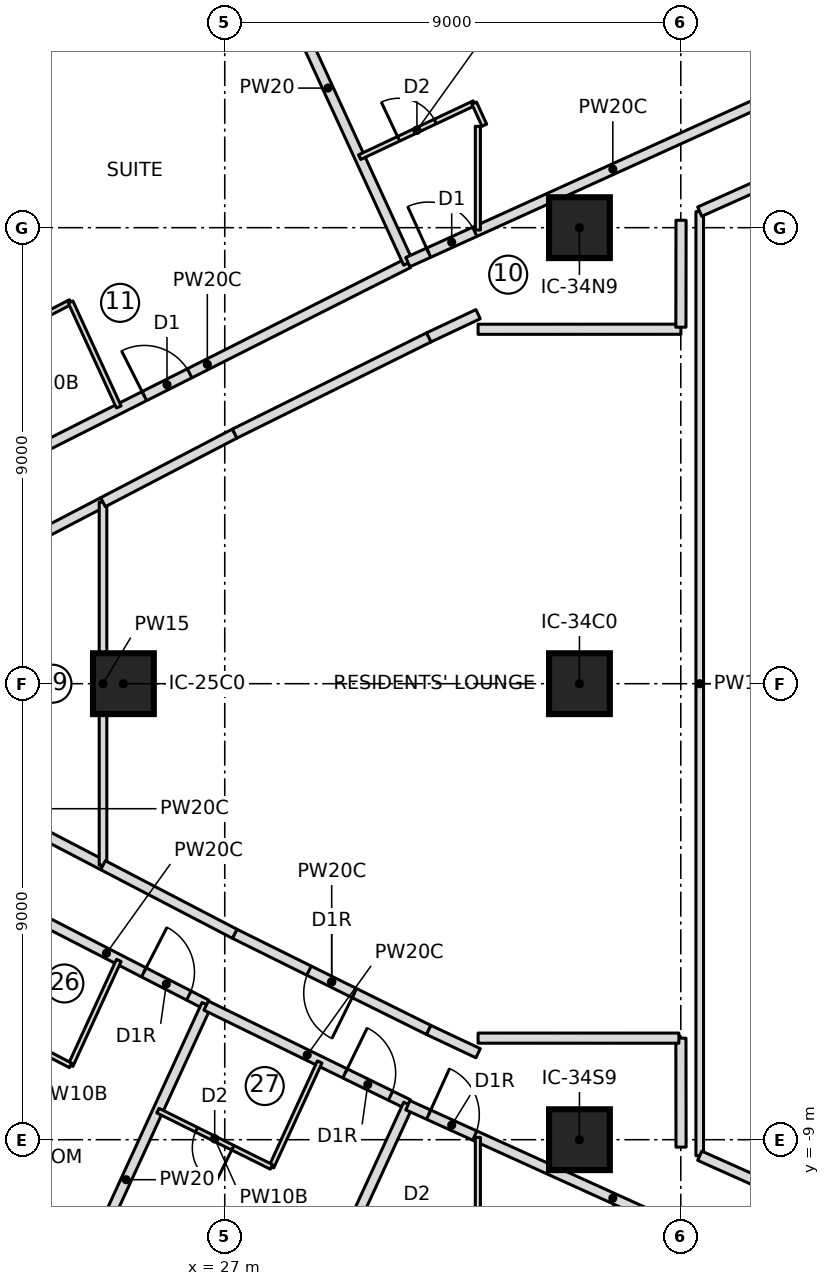
"""IFC4 building model, lengths in metres.
Left out: names, types, materials, properties, quantities, classifications, styles, units other than length and angle.
Written with IfcOpenShell. Run it as: python <this file> out.ifc"""

import sys

from ifc_helpers import new_model, si_unit, direction, frame, frame_2d, origin, origin_2d, place, context, subcontext, project, spatial, rectangle, extrude, element, fill, save


model = new_model("IFC4")
c1 = context("Model", 3, precision=1e-05, world=origin(), true_north=direction((0.0, 1.0)))
c2 = subcontext(c1, "Body", "Model", "MODEL_VIEW")
j1 = project(units=[si_unit("LENGTHUNIT", "METRE"), si_unit("PLANEANGLEUNIT", "RADIAN")], contexts=[c1])
p1 = place(None, origin())
s1 = spatial("IfcSite", under=j1, at=p1, CompositionType="ELEMENT")
p2 = place(p1, origin())
s2 = spatial("IfcBuilding", under=s1, at=p2, CompositionType="ELEMENT")
p3 = place(p2, frame((0.0, 0.0, 99.1)))
s3 = spatial("IfcBuildingStorey", under=s2, at=p3, CompositionType="ELEMENT", Elevation=99.1)
for number, where, z_axis, x_axis in (
    (1, (25.0, 0.0, 0.0), (0.0, 0.0, 1.0), (1.0, 0.0, 0.0)),
    (2, (34.0, -9.0, 0.0), (0.0, 0.0, 1.0), (1.0, 0.0, 0.0)),
    (3, (34.0, 0.0, 0.0), (0.0, 0.0, 1.0), (1.0, 0.0, 0.0)),
    (4, (34.0, 9.0, 0.0), (0.0, 0.0, 1.0), (1.0, 0.0, 0.0)),
):
    element("IfcColumn", number, at=place(p3, frame(where, z_axis=z_axis, x_axis=x_axis)), inside=s3, PredefinedType="COLUMN", context=c2, shape_type="SweptSolid", body=[
        extrude(rectangle(XDim=1.2, YDim=1.2, at=origin_2d()), origin(), (0.0, 0.0, 1.0), 3.55),
    ])
p4 = place(p3, frame((22.69, 4.302, 0.0), z_axis=(0.0, 0.0, 1.0), x_axis=(0.892904919467, 0.450245271815, 0.0)))
e5 = element("IfcWall", 5, at=p4, inside=s3, PredefinedType="PARTITIONING", context=c2, shape_type="SweptSolid", body=[
    extrude(rectangle(XDim=8.883, YDim=0.2, at=frame_2d((4.441, 0.0))), origin(), (0.0, 0.0, 1.0), 3.25),
])
p5 = place(p4, frame((3.05, 0.0, 0.0)))
e6 = element("IfcOpeningElement", 6, at=p5, cuts=e5, PredefinedType="OPENING", context=c2, shape_type="SweptSolid", body=[
    extrude(rectangle(XDim=1.0, YDim=2.1, at=frame_2d((0.5, 1.05))), frame((0.0, 0.11, 0.0), z_axis=(0.0, -1.0, 0.0), x_axis=(1.0, 0.0, 0.0)), (0.0, 0.0, 1.0), 0.22),
])
p6 = place(p3, frame((21.738, 6.377, 0.0), z_axis=(0.0, 0.0, 1.0), x_axis=(0.886911586599, 0.461939214135, 0.0)))
e7 = element("IfcWall", 7, at=p6, inside=s3, PredefinedType="PARTITIONING", context=c2, shape_type="SweptSolid", body=[
    extrude(rectangle(XDim=2.503, YDim=0.1, at=frame_2d((1.251, 0.0))), origin(), (0.0, 0.0, 1.0), 3.25),
])
p7 = place(p6, frame((0.85, 0.0, 0.0)))
e8 = element("IfcOpeningElement", 8, at=p7, cuts=e7, PredefinedType="OPENING", context=c2, shape_type="SweptSolid", body=[
    extrude(rectangle(XDim=0.8, YDim=2.1, at=frame_2d((0.4, 1.05))), frame((0.0, 0.06, 0.0), z_axis=(0.0, -1.0, 0.0), x_axis=(1.0, 0.0, 0.0)), (0.0, 0.0, 1.0), 0.12),
])
p8 = place(p3, frame((23.958, 7.533, 0.0), z_axis=(0.0, 0.0, 1.0), x_axis=(0.417454762401, -0.908697706253, 0.0)))
e9 = element("IfcWall", 9, at=p8, inside=s3, PredefinedType="PARTITIONING", context=c2, shape_type="SweptSolid", body=[
    extrude(rectangle(XDim=2.28, YDim=0.1, at=frame_2d((1.14, 0.0))), origin(), (0.0, 0.0, 1.0), 3.25),
])
p9 = place(p3, frame((30.622, 8.302, 0.0), z_axis=(0.0, 0.0, 1.0), x_axis=(-0.417429919618, 0.90870911859, 0.0)))
e10 = element("IfcWall", 10, at=p9, inside=s3, PredefinedType="PARTITIONING", context=c2, shape_type="SweptSolid", body=[
    extrude(rectangle(XDim=7.6, YDim=0.2, at=frame_2d((3.8, 0.0))), origin(), (0.0, 0.0, 1.0), 3.25),
])
p10 = place(p3, frame((30.614, 8.32, 0.0), z_axis=(0.0, 0.0, 1.0), x_axis=(0.910751030363, 0.41295588226, 0.0)))
e11 = element("IfcWall", 11, at=p10, inside=s3, PredefinedType="PARTITIONING", context=c2, shape_type="SweptSolid", body=[
    extrude(rectangle(XDim=8.883, YDim=0.2, at=frame_2d((4.442, 0.0))), origin(), (0.0, 0.0, 1.0), 3.25),
])
p11 = place(p10, frame((0.45, 0.0, 0.0)))
e12 = element("IfcOpeningElement", 12, at=p11, cuts=e11, PredefinedType="OPENING", context=c2, shape_type="SweptSolid", body=[
    extrude(rectangle(XDim=1.0, YDim=2.1, at=frame_2d((0.5, 1.05))), frame((0.0, 0.11, 0.0), z_axis=(0.0, -1.0, 0.0), x_axis=(1.0, 0.0, 0.0)), (0.0, 0.0, 1.0), 0.22),
])
p12 = place(p3, frame((29.662, 10.392, 0.0), z_axis=(0.0, 0.0, 1.0), x_axis=(0.904688082375, 0.426074493027, 0.0)))
e13 = element("IfcWall", 13, at=p12, inside=s3, PredefinedType="PARTITIONING", context=c2, shape_type="SweptSolid", body=[
    extrude(rectangle(XDim=2.5, YDim=0.1, at=frame_2d((1.25, 0.0))), origin(), (0.0, 0.0, 1.0), 3.25),
])
p13 = place(p12, frame((0.85, 0.0, 0.0)))
e14 = element("IfcOpeningElement", 14, at=p13, cuts=e13, PredefinedType="OPENING", context=c2, shape_type="SweptSolid", body=[
    extrude(rectangle(XDim=0.8, YDim=2.1, at=frame_2d((0.4, 1.05))), frame((0.0, 0.06, 0.0), z_axis=(0.0, -1.0, 0.0), x_axis=(1.0, 0.0, 0.0)), (0.0, 0.0, 1.0), 0.12),
])
p14 = place(p3, frame((31.924, 11.457, 0.0), z_axis=(0.0, 0.0, 1.0), x_axis=(0.4176025781, -0.908629785316, 0.0)))
e15 = element("IfcWall", 15, at=p14, inside=s3, PredefinedType="PARTITIONING", context=c2, shape_type="SweptSolid", body=[
    extrude(rectangle(XDim=0.479, YDim=0.1, at=frame_2d((0.239, 0.0))), origin(), (0.0, 0.0, 1.0), 3.25),
])
p15 = place(p3, frame((38.704, 11.989, 0.0), z_axis=(0.0, 0.0, 1.0), x_axis=(-0.417416334044, 0.908715359215, 0.0)))
e16 = element("IfcWall", 16, at=p15, inside=s3, PredefinedType="PARTITIONING", context=c2, shape_type="SweptSolid", body=[
    extrude(rectangle(XDim=7.604, YDim=0.2, at=frame_2d((3.802, 0.0))), origin(), (0.0, 0.0, 1.0), 3.25),
])
p16 = place(p3, frame((22.69, -4.302, 0.0), z_axis=(0.0, 0.0, 1.0), x_axis=(0.889236075961, -0.457448577667, 0.0)))
e17 = element("IfcWall", 17, at=p16, inside=s3, PredefinedType="PARTITIONING", context=c2, shape_type="SweptSolid", body=[
    extrude(rectangle(XDim=4.443, YDim=0.2, at=frame_2d((2.222, 0.0))), origin(), (0.0, 0.0, 1.0), 3.25),
])
p17 = place(p16, frame((3.05, 0.0, 0.0)))
e18 = element("IfcOpeningElement", 18, at=p17, cuts=e17, PredefinedType="OPENING", context=c2, shape_type="SweptSolid", body=[
    extrude(rectangle(XDim=1.0, YDim=2.1, at=frame_2d((0.5, 1.05))), frame((0.0, 0.11, 0.0), z_axis=(0.0, -1.0, 0.0), x_axis=(1.0, 0.0, 0.0)), (0.0, 0.0, 1.0), 0.22),
])
p18 = place(p3, frame((24.909, -5.462, 0.0), z_axis=(0.0, 0.0, 1.0), x_axis=(-0.417454762401, -0.908697706253, 0.0)))
e19 = element("IfcWall", 19, at=p18, inside=s3, PredefinedType="PARTITIONING", context=c2, shape_type="SweptSolid", body=[
    extrude(rectangle(XDim=2.28, YDim=0.1, at=frame_2d((1.14, 0.0))), origin(), (0.0, 0.0, 1.0), 3.25),
])
p19 = place(p3, frame((23.958, -7.533, 0.0), z_axis=(0.0, 0.0, 1.0), x_axis=(-0.886911586599, 0.461939214135, 0.0)))
e20 = element("IfcWall", 20, at=p19, inside=s3, PredefinedType="PARTITIONING", context=c2, shape_type="SweptSolid", body=[
    extrude(rectangle(XDim=2.503, YDim=0.1, at=frame_2d((1.251, 0.0))), origin(), (0.0, 0.0, 1.0), 3.25),
])
p20 = place(p19, frame((0.85, 0.0, 0.0)))
e21 = element("IfcOpeningElement", 21, at=p20, cuts=e20, PredefinedType="OPENING", context=c2, shape_type="SweptSolid", body=[
    extrude(rectangle(XDim=0.8, YDim=2.1, at=frame_2d((0.4, 1.05))), frame((0.0, 0.06, 0.0), z_axis=(0.0, -1.0, 0.0), x_axis=(1.0, 0.0, 0.0)), (0.0, 0.0, 1.0), 0.12),
])
p21 = place(p3, frame((23.467, -13.244, 0.0), z_axis=(0.0, 0.0, 1.0), x_axis=(0.417455028008, 0.908697584233, 0.0)))
e22 = element("IfcWall", 22, at=p21, inside=s3, PredefinedType="PARTITIONING", context=c2, shape_type="SweptSolid", body=[
    extrude(rectangle(XDim=7.603, YDim=0.2, at=frame_2d((3.802, 0.0))), origin(), (0.0, 0.0, 1.0), 3.25),
])
p22 = place(p3, frame((26.633, -6.353, 0.0), z_axis=(0.0, 0.0, 1.0), x_axis=(0.898502457097, -0.438968489291, 0.0)))
e23 = element("IfcWall", 23, at=p22, inside=s3, PredefinedType="PARTITIONING", context=c2, shape_type="SweptSolid", body=[
    extrude(rectangle(XDim=4.44, YDim=0.2, at=frame_2d((2.22, 0.0))), origin(), (0.0, 0.0, 1.0), 3.25),
])
p23 = place(p22, frame((3.05, 0.0, 0.0)))
e24 = element("IfcOpeningElement", 24, at=p23, cuts=e23, PredefinedType="OPENING", context=c2, shape_type="SweptSolid", body=[
    extrude(rectangle(XDim=1.0, YDim=2.1, at=frame_2d((0.5, 1.05))), frame((0.0, 0.11, 0.0), z_axis=(0.0, -1.0, 0.0), x_axis=(1.0, 0.0, 0.0)), (0.0, 0.0, 1.0), 0.22),
])
p24 = place(p3, frame((28.873, -7.467, 0.0), z_axis=(0.0, 0.0, 1.0), x_axis=(-0.417433204355, -0.908707609686, 0.0)))
e25 = element("IfcWall", 25, at=p24, inside=s3, PredefinedType="PARTITIONING", context=c2, shape_type="SweptSolid", body=[
    extrude(rectangle(XDim=2.278, YDim=0.1, at=frame_2d((1.139, 0.0))), origin(), (0.0, 0.0, 1.0), 3.25),
])
p25 = place(p3, frame((27.922, -9.537, 0.0), z_axis=(0.0, 0.0, 1.0), x_axis=(-0.895944857815, 0.444165297784, 0.0)))
e26 = element("IfcWall", 26, at=p25, inside=s3, PredefinedType="PARTITIONING", context=c2, shape_type="SweptSolid", body=[
    extrude(rectangle(XDim=2.501, YDim=0.1, at=frame_2d((1.25, 0.0))), origin(), (0.0, 0.0, 1.0), 3.25),
])
p26 = place(p25, frame((0.85, 0.0, 0.0)))
e27 = element("IfcOpeningElement", 27, at=p26, cuts=e26, PredefinedType="OPENING", context=c2, shape_type="SweptSolid", body=[
    extrude(rectangle(XDim=0.8, YDim=2.1, at=frame_2d((0.4, 1.05))), frame((0.0, 0.06, 0.0), z_axis=(0.0, -1.0, 0.0), x_axis=(1.0, 0.0, 0.0)), (0.0, 0.0, 1.0), 0.12),
])
p27 = place(p3, frame((27.449, -15.208, 0.0), z_axis=(0.0, 0.0, 1.0), x_axis=(0.417429919618, 0.90870911859, 0.0)))
e28 = element("IfcWall", 28, at=p27, inside=s3, PredefinedType="PARTITIONING", context=c2, shape_type="SweptSolid", body=[
    extrude(rectangle(XDim=7.6, YDim=0.2, at=frame_2d((3.8, 0.0))), origin(), (0.0, 0.0, 1.0), 3.25),
])
p28 = place(p3, frame((30.614, -8.32, 0.0), z_axis=(0.0, 0.0, 1.0), x_axis=(0.910751030363, -0.41295588226, 0.0)))
e29 = element("IfcWall", 29, at=p28, inside=s3, PredefinedType="PARTITIONING", context=c2, shape_type="SweptSolid", body=[
    extrude(rectangle(XDim=8.883, YDim=0.2, at=frame_2d((4.442, 0.0))), origin(), (0.0, 0.0, 1.0), 3.25),
])
p29 = place(p28, frame((0.45, 0.0, 0.0)))
e30 = element("IfcOpeningElement", 30, at=p29, cuts=e29, PredefinedType="OPENING", context=c2, shape_type="SweptSolid", body=[
    extrude(rectangle(XDim=1.0, YDim=2.1, at=frame_2d((0.5, 1.05))), frame((0.0, 0.11, 0.0), z_axis=(0.0, -1.0, 0.0), x_axis=(1.0, 0.0, 0.0)), (0.0, 0.0, 1.0), 0.22),
])
for number, where, z_axis, x_axis in (
    (31, (23.407, 2.962, 0.0), (0.0, 0.0, 1.0), (0.887, 0.462, 0.0)),
    (32, (24.598, -3.582, 0.0), (0.0, 0.0, 1.0), (-0.887, 0.462, 0.0)),
):
    element("IfcWall", number, at=place(p3, frame(where, z_axis=z_axis, x_axis=x_axis)), inside=s3, PredefinedType="PARTITIONING", context=c2, shape_type="SweptSolid", body=[
        extrude(rectangle(XDim=1.343, YDim=0.2, at=frame_2d((0.671, 0.0))), origin(), (0.0, 0.0, 1.0), 3.25),
    ])
p30 = place(p3, frame((24.598, -3.582, 0.0), z_axis=(0.0, 0.0, 1.0), x_axis=(0.0, 1.0, 0.0)))
e33 = element("IfcWall", 33, at=p30, inside=s3, PredefinedType="PARTITIONING", context=c2, shape_type="SweptSolid", body=[
    extrude(rectangle(XDim=7.165, YDim=0.15, at=frame_2d((3.582, 0.0))), origin(), (0.0, 0.0, 1.0), 3.25),
])
p31 = place(p3, frame((31.025, -6.833, 0.0), z_axis=(0.0, 0.0, 1.0), x_axis=(-0.895975836328, 0.44410280422, 0.0)))
e34 = element("IfcWall", 34, at=p31, inside=s3, PredefinedType="PARTITIONING", context=c2, shape_type="SweptSolid", body=[
    extrude(rectangle(XDim=4.273, YDim=0.2, at=frame_2d((2.137, 0.0))), origin(), (0.0, 0.0, 1.0), 3.25),
])
p32 = place(p31, frame((1.636, 0.0, 0.0)))
e35 = element("IfcOpeningElement", 35, at=p32, cuts=e34, PredefinedType="OPENING", context=c2, shape_type="SweptSolid", body=[
    extrude(rectangle(XDim=1.0, YDim=2.1, at=frame_2d((0.5, 1.05))), frame((0.0, 0.11, 0.0), z_axis=(0.0, -1.0, 0.0), x_axis=(1.0, 0.0, 0.0)), (0.0, 0.0, 1.0), 0.22),
])
for number, where, z_axis, x_axis in (
    (36, (31.025, 6.833, 0.0), (0.0, 0.0, 1.0), (0.905, 0.426, 0.0)),
    (37, (32.0, -7.293, 0.0), (0.0, 0.0, 1.0), (-0.905, 0.426, 0.0)),
):
    element("IfcWall", number, at=place(p3, frame(where, z_axis=z_axis, x_axis=x_axis)), inside=s3, PredefinedType="PARTITIONING", context=c2, shape_type="SweptSolid", body=[
        extrude(rectangle(XDim=1.078, YDim=0.2, at=frame_2d((0.539, 0.0))), origin(), (0.0, 0.0, 1.0), 3.25),
    ])
for number, where, z_axis, x_axis in (
    (38, (27.196, -4.936, 0.0), (0.0, 0.0, 1.0), (-0.887, 0.462, 0.0)),
    (39, (24.598, 3.582, 0.0), (0.0, 0.0, 1.0), (0.887, 0.462, 0.0)),
):
    element("IfcWall", number, at=place(p3, frame(where, z_axis=z_axis, x_axis=x_axis)), inside=s3, PredefinedType="PARTITIONING", context=c2, shape_type="SweptSolid", body=[
        extrude(rectangle(XDim=2.93, YDim=0.2, at=frame_2d((1.465, 0.0))), origin(), (0.0, 0.0, 1.0), 3.25),
    ])
p33 = place(p3, frame((27.196, 4.936, 0.0), z_axis=(0.0, 0.0, 1.0), x_axis=(0.895975836328, 0.44410280422, 0.0)))
e40 = element("IfcWall", 40, at=p33, inside=s3, PredefinedType="PARTITIONING", context=c2, shape_type="SweptSolid", body=[
    extrude(rectangle(XDim=4.273, YDim=0.2, at=frame_2d((2.137, 0.0))), origin(), (0.0, 0.0, 1.0), 3.25),
])
p34 = place(p3, frame((36.374, -9.317, 0.0), z_axis=(0.0, 0.0, 1.0), x_axis=(0.0, 1.0, 0.0)))
e41 = element("IfcWall", 41, at=p34, inside=s3, PredefinedType="PARTITIONING", context=c2, shape_type="SweptSolid", body=[
    extrude(rectangle(XDim=18.634, YDim=0.15, at=frame_2d((9.317, 0.0))), origin(), (0.0, 0.0, 1.0), 3.25),
])
for number, where, z_axis, x_axis in (
    (42, (38.792, -10.397, 0.0), (0.0, 0.0, 1.0), (-0.913, 0.408, 0.0)),
    (43, (36.374, 9.317, 0.0), (0.0, 0.0, 1.0), (0.913, 0.408, 0.0)),
):
    element("IfcWall", number, at=place(p3, frame(where, z_axis=z_axis, x_axis=x_axis)), inside=s3, PredefinedType="PARTITIONING", context=c2, shape_type="SweptSolid", body=[
        extrude(rectangle(XDim=2.648, YDim=0.2, at=frame_2d((1.324, 0.0))), origin(), (0.0, 0.0, 1.0), 3.25),
    ])
for number, where, z_axis, x_axis in (
    (44, (31.995, 11.0, 0.0), (0.0, 0.0, 1.0), (0.0, -1.0, 0.0)),
    (45, (31.995, -8.954, 0.0), (0.0, 0.0, 1.0), (0.0, -1.0, 0.0)),
):
    element("IfcWall", number, at=place(p3, frame(where, z_axis=z_axis, x_axis=x_axis)), inside=s3, PredefinedType="PARTITIONING", context=c2, shape_type="SweptSolid", body=[
        extrude(rectangle(XDim=2.046, YDim=0.1, at=frame_2d((1.023, 0.0))), origin(), (0.0, 0.0, 1.0), 3.25),
    ])
p35 = place(p3, frame((36.005, -9.146, 0.0), z_axis=(0.0, 0.0, 1.0), x_axis=(-0.001135073049, 0.999999355804, 0.0)))
e46 = element("IfcWall", 46, at=p35, inside=s3, PredefinedType="PARTITIONING", context=c2, shape_type="SweptSolid", body=[
    extrude(rectangle(XDim=2.151, YDim=0.2, at=frame_2d((1.075, 0.0))), origin(), (0.0, 0.0, 1.0), 3.25),
])
p36 = place(p3, frame((35.962, -6.996, 0.0), z_axis=(0.0, 0.0, 1.0), x_axis=(-0.999999992409, 0.000123213405, 0.0)))
e47 = element("IfcWall", 47, at=p36, inside=s3, PredefinedType="PARTITIONING", context=c2, shape_type="SweptSolid", body=[
    extrude(rectangle(XDim=3.963, YDim=0.2, at=frame_2d((1.981, 0.0))), origin(), (0.0, 0.0, 1.0), 3.25),
])
p37 = place(p3, frame((32.0, 6.995, 0.0), z_axis=(0.0, 0.0, 1.0), x_axis=(0.99999999256, 0.00012198097, 0.0)))
e48 = element("IfcWall", 48, at=p37, inside=s3, PredefinedType="PARTITIONING", context=c2, shape_type="SweptSolid", body=[
    extrude(rectangle(XDim=4.003, YDim=0.2, at=frame_2d((2.001, 0.0))), origin(), (0.0, 0.0, 1.0), 3.25),
])
p38 = place(p3, frame((36.002, 7.036, 0.0), z_axis=(0.0, 0.0, 1.0), x_axis=(0.001156603436, 0.999999331134, 0.0)))
e49 = element("IfcWall", 49, at=p38, inside=s3, PredefinedType="PARTITIONING", context=c2, shape_type="SweptSolid", body=[
    extrude(rectangle(XDim=2.111, YDim=0.2, at=frame_2d((1.055, 0.0))), origin(), (0.0, 0.0, 1.0), 3.25),
])
p39 = place(p5, origin())
e50 = element("IfcDoor", 50, at=p39, inside=s3, OperationType="SINGLE_SWING_LEFT", PredefinedType="DOOR", context=c2, shape_type="SweptSolid", body=[
    extrude(rectangle(XDim=1.0, YDim=2.1, at=frame_2d((0.5, 1.05))), frame((0.0, 0.025, 0.0), z_axis=(0.0, -1.0, 0.0), x_axis=(1.0, 0.0, 0.0)), (0.0, 0.0, 1.0), 0.05),
])
fill(e6, e50)
p40 = place(p13, origin())
e51 = element("IfcDoor", 51, at=p40, inside=s3, OperationType="SINGLE_SWING_LEFT", PredefinedType="DOOR", context=c2, shape_type="SweptSolid", body=[
    extrude(rectangle(XDim=0.8, YDim=2.1, at=frame_2d((0.4, 1.05))), frame((0.0, 0.025, 0.0), z_axis=(0.0, -1.0, 0.0), x_axis=(1.0, 0.0, 0.0)), (0.0, 0.0, 1.0), 0.05),
])
fill(e14, e51)
p41 = place(p11, origin())
e52 = element("IfcDoor", 52, at=p41, inside=s3, OperationType="SINGLE_SWING_LEFT", PredefinedType="DOOR", context=c2, shape_type="SweptSolid", body=[
    extrude(rectangle(XDim=1.0, YDim=2.1, at=frame_2d((0.5, 1.05))), frame((0.0, 0.025, 0.0), z_axis=(0.0, -1.0, 0.0), x_axis=(1.0, 0.0, 0.0)), (0.0, 0.0, 1.0), 0.05),
])
fill(e12, e52)
p42 = place(p17, origin())
e53 = element("IfcDoor", 53, at=p42, inside=s3, OperationType="SINGLE_SWING_RIGHT", PredefinedType="DOOR", context=c2, shape_type="SweptSolid", body=[
    extrude(rectangle(XDim=1.0, YDim=2.1, at=frame_2d((0.5, 1.05))), frame((0.0, 0.025, 0.0), z_axis=(0.0, -1.0, 0.0), x_axis=(1.0, 0.0, 0.0)), (0.0, 0.0, 1.0), 0.05),
])
fill(e18, e53)
p43 = place(p26, origin())
e54 = element("IfcDoor", 54, at=p43, inside=s3, OperationType="SINGLE_SWING_LEFT", PredefinedType="DOOR", context=c2, shape_type="SweptSolid", body=[
    extrude(rectangle(XDim=0.8, YDim=2.1, at=frame_2d((0.4, 1.05))), frame((0.0, 0.025, 0.0), z_axis=(0.0, -1.0, 0.0), x_axis=(1.0, 0.0, 0.0)), (0.0, 0.0, 1.0), 0.05),
])
fill(e27, e54)
p44 = place(p23, origin())
e55 = element("IfcDoor", 55, at=p44, inside=s3, OperationType="SINGLE_SWING_RIGHT", PredefinedType="DOOR", context=c2, shape_type="SweptSolid", body=[
    extrude(rectangle(XDim=1.0, YDim=2.1, at=frame_2d((0.5, 1.05))), frame((0.0, 0.025, 0.0), z_axis=(0.0, -1.0, 0.0), x_axis=(1.0, 0.0, 0.0)), (0.0, 0.0, 1.0), 0.05),
])
fill(e24, e55)
p45 = place(p29, origin())
e56 = element("IfcDoor", 56, at=p45, inside=s3, OperationType="SINGLE_SWING_RIGHT", PredefinedType="DOOR", context=c2, shape_type="SweptSolid", body=[
    extrude(rectangle(XDim=1.0, YDim=2.1, at=frame_2d((0.5, 1.05))), frame((0.0, 0.025, 0.0), z_axis=(0.0, -1.0, 0.0), x_axis=(1.0, 0.0, 0.0)), (0.0, 0.0, 1.0), 0.05),
])
fill(e30, e56)
p46 = place(p32, origin())
e57 = element("IfcDoor", 57, at=p46, inside=s3, OperationType="SINGLE_SWING_RIGHT", PredefinedType="DOOR", context=c2, shape_type="SweptSolid", body=[
    extrude(rectangle(XDim=1.0, YDim=2.1, at=frame_2d((0.5, 1.05))), frame((0.0, 0.025, 0.0), z_axis=(0.0, -1.0, 0.0), x_axis=(1.0, 0.0, 0.0)), (0.0, 0.0, 1.0), 0.05),
])
fill(e35, e57)
save(model, sys.argv[1])
